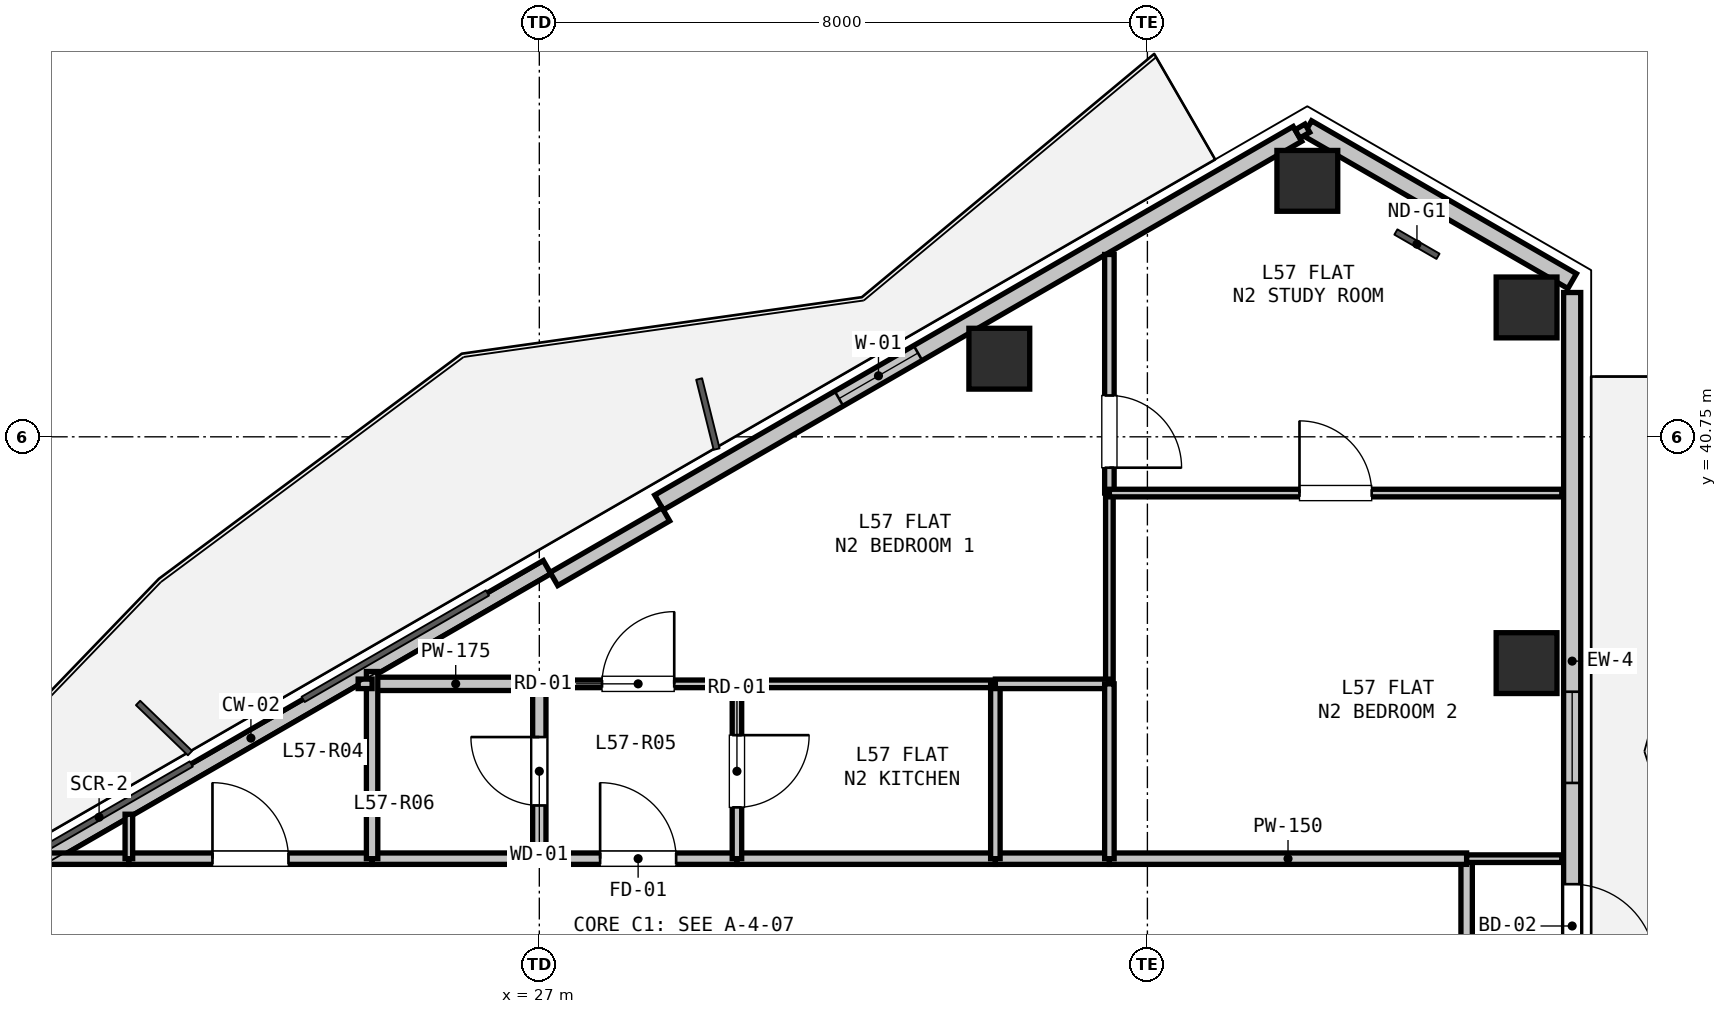
"""IFC4 building model, lengths in metres.
Left out: names, types, materials, properties, quantities, classifications, styles, units other than length and angle.
Written with IfcOpenShell. Run it as: python <this file> out.ifc"""

import sys

from ifc_helpers import new_model, si_unit, direction, frame, frame_2d, origin, origin_2d, place, context, subcontext, project, spatial, rectangle, hollow_rectangle, extrude, element, fill, save


model = new_model("IFC4")
c1 = context("Model", 3, precision=1e-05, world=origin(), true_north=direction((0.0, 1.0)))
c2 = subcontext(c1, "Body", "Model", "MODEL_VIEW")
j1 = project(units=[si_unit("LENGTHUNIT", "METRE"), si_unit("PLANEANGLEUNIT", "RADIAN")], contexts=[c1])
p1 = place(None, origin())
s1 = spatial("IfcSite", under=j1, at=p1, CompositionType="ELEMENT")
p2 = place(p1, origin())
s2 = spatial("IfcBuilding", under=s1, at=p2, CompositionType="ELEMENT")
p3 = place(p2, frame((0.0, 0.0, 205.2)))
s3 = spatial("IfcBuildingStorey", under=s2, at=p3, CompositionType="ELEMENT", Elevation=205.2)
for number, where, z_axis, x_axis in (
    (1, (33.052, 41.778, 0.0), (0.0, 0.0, 1.0), (1.0, 0.0, 0.0)),
    (2, (37.104, 44.117, 0.0), (0.0, 0.0, 1.0), (1.0, 0.0, 0.0)),
    (3, (39.988, 42.452, 0.0), (0.0, 0.0, 1.0), (1.0, 0.0, 0.0)),
    (4, (39.988, 37.773, 0.0), (0.0, 0.0, 1.0), (1.0, 0.0, 0.0)),
):
    element("IfcColumn", number, at=place(p3, frame(where, z_axis=z_axis, x_axis=x_axis)), inside=s3, PredefinedType="COLUMN", context=c2, shape_type="SweptSolid", body=[
        extrude(hollow_rectangle(XDim=0.8, YDim=0.8, WallThickness=0.025, at=origin_2d()), origin(), (0.0, 0.0, 1.0), 3.3),
    ])
p4 = place(p3, frame((37.104, 44.81, 0.0), z_axis=(0.0, 0.0, 1.0), x_axis=(0.866023907196, -0.500002592159, 0.0)))
e5 = element("IfcWall", 5, at=p4, inside=s3, PredefinedType="SOLIDWALL", context=c2, shape_type="SweptSolid", body=[
    extrude(rectangle(XDim=4.023, YDim=0.225, at=frame_2d((2.012, 0.0))), origin(), (0.0, 0.0, 1.0), 2.69),
])
p5 = place(p3, frame((19.309, 34.536, 0.0), z_axis=(0.0, 0.0, 1.0), x_axis=(0.866020680503, 0.500008180874, 0.0)))
e6 = element("IfcWall", 6, at=p5, inside=s3, PredefinedType="PARAPET", context=c2, shape_type="SweptSolid", body=[
    extrude(rectangle(XDim=8.999, YDim=0.2, at=frame_2d((4.5, 0.0))), origin(), (0.0, 0.0, 1.0), 0.2),
])
p6 = place(p3, frame((28.575, 39.885, 0.0), z_axis=(0.0, 0.0, 1.0), x_axis=(0.866016233231, 0.500015883528, 0.0)))
e7 = element("IfcWall", 7, at=p6, inside=s3, PredefinedType="SOLIDWALL", context=c2, shape_type="SweptSolid", body=[
    extrude(rectangle(XDim=9.699, YDim=0.225, at=frame_2d((4.85, 0.0))), origin(), (0.0, 0.0, 1.0), 2.69),
])
p7 = place(p6, frame((2.734, 0.0, 0.9)))
e8 = element("IfcOpeningElement", 8, at=p7, cuts=e7, PredefinedType="OPENING", context=c2, shape_type="SweptSolid", body=[
    extrude(rectangle(XDim=1.2, YDim=1.4, at=frame_2d((0.6, 0.7))), frame((0.0, 0.123, 0.0), z_axis=(0.0, -1.0, 0.0), x_axis=(1.0, 0.0, 0.0)), (0.0, 0.0, 1.0), 0.245),
])
p8 = place(p3, frame((27.192, 38.88, 0.0), z_axis=(0.0, 0.0, 1.0), x_axis=(0.866025371046, 0.500000056704, 0.0)))
e9 = element("IfcWall", 9, at=p8, inside=s3, PredefinedType="PARAPET", context=c2, shape_type="SweptSolid", body=[
    extrude(rectangle(XDim=1.7, YDim=0.2, at=frame_2d((0.85, 0.0))), origin(), (0.0, 0.0, 1.0), 2.69),
])
p9 = place(p3, frame((40.588, 42.648, 0.0), z_axis=(0.0, 0.0, 1.0), x_axis=(0.0, -1.0, 0.0)))
e10 = element("IfcWall", 10, at=p9, inside=s3, PredefinedType="SOLIDWALL", context=c2, shape_type="SweptSolid", body=[
    extrude(rectangle(XDim=9.699, YDim=0.225, at=frame_2d((4.85, 0.0))), origin(), (0.0, 0.0, 1.0), 2.69),
])
p10 = place(p9, frame((7.784, 0.0, 0.0)))
e11 = element("IfcOpeningElement", 11, at=p10, cuts=e10, PredefinedType="OPENING", context=c2, shape_type="SweptSolid", body=[
    extrude(rectangle(XDim=1.1, YDim=2.1, at=frame_2d((0.55, 1.05))), frame((0.0, 0.123, 0.0), z_axis=(0.0, -1.0, 0.0), x_axis=(1.0, 0.0, 0.0)), (0.0, 0.0, 1.0), 0.245),
])
p11 = place(p9, frame((5.252, 0.0, 0.9)))
e12 = element("IfcOpeningElement", 12, at=p11, cuts=e10, PredefinedType="OPENING", context=c2, shape_type="SweptSolid", body=[
    extrude(rectangle(XDim=1.2, YDim=1.4, at=frame_2d((0.6, 0.7))), frame((0.0, 0.123, 0.0), z_axis=(0.0, -1.0, 0.0), x_axis=(1.0, 0.0, 0.0)), (0.0, 0.0, 1.0), 0.245),
])
p12 = place(p3, frame((39.2, 35.2, 0.0), z_axis=(0.0, 0.0, 1.0), x_axis=(0.0, -1.0, 0.0)))
e13 = element("IfcWall", 13, at=p12, inside=s3, PredefinedType="PARTITIONING", context=c2, shape_type="SweptSolid", body=[
    extrude(rectangle(XDim=1.6, YDim=0.15, at=frame_2d((0.8, 0.0))), origin(), (0.0, 0.0, 1.0), 3.07),
])
p13 = place(p3, frame((20.528, 35.2, 0.0), z_axis=(0.0, 0.0, 1.0), x_axis=(1.0, 0.0, 0.0)))
e14 = element("IfcWall", 14, at=p13, inside=s3, PredefinedType="PARTITIONING", context=c2, shape_type="SweptSolid", body=[
    extrude(rectangle(XDim=1.072, YDim=0.15, at=frame_2d((0.536, 0.0))), origin(), (0.0, 0.0, 1.0), 2.365),
])
p14 = place(p3, frame((21.6, 35.2, 0.0), z_axis=(0.0, 0.0, 1.0), x_axis=(1.0, 0.0, 0.0)))
e15 = element("IfcWall", 15, at=p14, inside=s3, PredefinedType="PARTITIONING", context=c2, shape_type="SweptSolid", body=[
    extrude(rectangle(XDim=3.2, YDim=0.15, at=frame_2d((1.6, 0.0))), origin(), (0.0, 0.0, 1.0), 2.365),
])
p15 = place(p14, frame((1.1, 0.0, 0.0)))
e16 = element("IfcOpeningElement", 16, at=p15, cuts=e15, PredefinedType="OPENING", context=c2, shape_type="SweptSolid", body=[
    extrude(rectangle(XDim=1.0, YDim=2.15, at=frame_2d((0.5, 1.075))), frame((0.0, 0.085, 0.0), z_axis=(0.0, -1.0, 0.0), x_axis=(1.0, 0.0, 0.0)), (0.0, 0.0, 1.0), 0.17),
])
p16 = place(p3, frame((24.8, 35.2, 0.0), z_axis=(0.0, 0.0, 1.0), x_axis=(1.0, 0.0, 0.0)))
e17 = element("IfcWall", 17, at=p16, inside=s3, PredefinedType="PARTITIONING", context=c2, shape_type="SweptSolid", body=[
    extrude(rectangle(XDim=2.2, YDim=0.15, at=frame_2d((1.1, 0.0))), origin(), (0.0, 0.0, 1.0), 3.07),
])
p17 = place(p3, frame((27.0, 35.2, 0.0), z_axis=(0.0, 0.0, 1.0), x_axis=(1.0, 0.0, 0.0)))
e18 = element("IfcWall", 18, at=p17, inside=s3, PredefinedType="PARTITIONING", context=c2, shape_type="SweptSolid", body=[
    extrude(rectangle(XDim=2.6, YDim=0.15, at=frame_2d((1.3, 0.0))), origin(), (0.0, 0.0, 1.0), 3.07),
])
p18 = place(p17, frame((0.8, 0.0, 0.0)))
e19 = element("IfcOpeningElement", 19, at=p18, cuts=e18, PredefinedType="OPENING", context=c2, shape_type="SweptSolid", body=[
    extrude(rectangle(XDim=1.0, YDim=2.15, at=frame_2d((0.5, 1.075))), frame((0.0, 0.085, 0.0), z_axis=(0.0, -1.0, 0.0), x_axis=(1.0, 0.0, 0.0)), (0.0, 0.0, 1.0), 0.17),
])
p19 = place(p3, frame((29.6, 35.2, 0.0), z_axis=(0.0, 0.0, 1.0), x_axis=(1.0, 0.0, 0.0)))
e20 = element("IfcWall", 20, at=p19, inside=s3, PredefinedType="PARTITIONING", context=c2, shape_type="SweptSolid", body=[
    extrude(rectangle(XDim=3.4, YDim=0.15, at=frame_2d((1.7, 0.0))), origin(), (0.0, 0.0, 1.0), 3.07),
])
p20 = place(p3, frame((33.0, 35.2, 0.0), z_axis=(0.0, 0.0, 1.0), x_axis=(1.0, 0.0, 0.0)))
e21 = element("IfcWall", 21, at=p20, inside=s3, PredefinedType="PARTITIONING", context=c2, shape_type="SweptSolid", body=[
    extrude(rectangle(XDim=1.5, YDim=0.15, at=frame_2d((0.75, 0.0))), origin(), (0.0, 0.0, 1.0), 3.07),
])
p21 = place(p3, frame((34.5, 35.2, 0.0), z_axis=(0.0, 0.0, 1.0), x_axis=(1.0, 0.0, 0.0)))
e22 = element("IfcWall", 22, at=p21, inside=s3, PredefinedType="PARTITIONING", context=c2, shape_type="SweptSolid", body=[
    extrude(rectangle(XDim=4.7, YDim=0.15, at=frame_2d((2.35, 0.0))), origin(), (0.0, 0.0, 1.0), 2.518),
])
p22 = place(p3, frame((27.0, 37.5, 0.0), z_axis=(0.0, 0.0, 1.0), x_axis=(1.0, 0.0, 0.0)))
e23 = element("IfcWall", 23, at=p22, inside=s3, PredefinedType="PARTITIONING", context=c2, shape_type="SweptSolid", body=[
    extrude(rectangle(XDim=2.6, YDim=0.1, at=frame_2d((1.3, 0.0))), origin(), (0.0, 0.0, 1.0), 3.07),
])
p23 = place(p22, frame((0.825, 0.0, 0.0)))
e24 = element("IfcOpeningElement", 24, at=p23, cuts=e23, PredefinedType="OPENING", context=c2, shape_type="SweptSolid", body=[
    extrude(rectangle(XDim=0.95, YDim=2.1, at=frame_2d((0.475, 1.05))), frame((0.0, 0.06, 0.0), z_axis=(0.0, -1.0, 0.0), x_axis=(1.0, 0.0, 0.0)), (0.0, 0.0, 1.0), 0.12),
])
p24 = place(p3, frame((29.6, 37.5, 0.0), z_axis=(0.0, 0.0, 1.0), x_axis=(0.0, -1.0, 0.0)))
e25 = element("IfcWall", 25, at=p24, inside=s3, PredefinedType="PARTITIONING", context=c2, shape_type="SweptSolid", body=[
    extrude(rectangle(XDim=2.3, YDim=0.125, at=frame_2d((1.15, 0.0))), origin(), (0.0, 0.0, 1.0), 3.07),
])
p25 = place(p24, frame((0.675, 0.0, 0.0)))
e26 = element("IfcOpeningElement", 26, at=p25, cuts=e25, PredefinedType="OPENING", context=c2, shape_type="SweptSolid", body=[
    extrude(rectangle(XDim=0.95, YDim=2.1, at=frame_2d((0.475, 1.05))), frame((0.0, 0.073, 0.0), z_axis=(0.0, -1.0, 0.0), x_axis=(1.0, 0.0, 0.0)), (0.0, 0.0, 1.0), 0.145),
])
p26 = place(p3, frame((27.0, 35.2, 0.0), z_axis=(0.0, 0.0, 1.0), x_axis=(0.0, 1.0, 0.0)))
e27 = element("IfcWall", 27, at=p26, inside=s3, PredefinedType="PLUMBINGWALL", context=c2, shape_type="SweptSolid", body=[
    extrude(rectangle(XDim=2.3, YDim=0.175, at=frame_2d((1.15, 0.0))), origin(), (0.0, 0.0, 1.0), 3.07),
])
p27 = place(p26, frame((0.7, 0.0, 0.0)))
e28 = element("IfcOpeningElement", 28, at=p27, cuts=e27, PredefinedType="OPENING", context=c2, shape_type="SweptSolid", body=[
    extrude(rectangle(XDim=0.9, YDim=2.1, at=frame_2d((0.45, 1.05))), frame((0.0, 0.097, 0.0), z_axis=(0.0, -1.0, 0.0), x_axis=(1.0, 0.0, 0.0)), (0.0, 0.0, 1.0), 0.195),
])
p28 = place(p3, frame((24.8, 37.5, 0.0), z_axis=(0.0, 0.0, 1.0), x_axis=(1.0, 0.0, 0.0)))
e29 = element("IfcWall", 29, at=p28, inside=s3, PredefinedType="PLUMBINGWALL", context=c2, shape_type="SweptSolid", body=[
    extrude(rectangle(XDim=2.2, YDim=0.175, at=frame_2d((1.1, 0.0))), origin(), (0.0, 0.0, 1.0), 2.365),
])
p29 = place(p3, frame((24.8, 35.2, 0.0), z_axis=(0.0, 0.0, 1.0), x_axis=(0.0, 1.0, 0.0)))
e30 = element("IfcWall", 30, at=p29, inside=s3, PredefinedType="PARTITIONING", context=c2, shape_type="SweptSolid", body=[
    extrude(rectangle(XDim=2.462, YDim=0.15, at=frame_2d((1.231, 0.0))), origin(), (0.0, 0.0, 1.0), 2.365),
])
p30 = place(p3, frame((29.6, 37.5, 0.0), z_axis=(0.0, 0.0, 1.0), x_axis=(1.0, 0.0, 0.0)))
e31 = element("IfcWall", 31, at=p30, inside=s3, PredefinedType="PARTITIONING", context=c2, shape_type="SweptSolid", body=[
    extrude(rectangle(XDim=3.4, YDim=0.1, at=frame_2d((1.7, 0.0))), origin(), (0.0, 0.0, 1.0), 3.07),
])
p31 = place(p3, frame((33.0, 37.5, 0.0), z_axis=(0.0, 0.0, 1.0), x_axis=(0.0, -1.0, 0.0)))
e32 = element("IfcWall", 32, at=p31, inside=s3, PredefinedType="PARTITIONING", context=c2, shape_type="SweptSolid", body=[
    extrude(rectangle(XDim=2.3, YDim=0.125, at=frame_2d((1.15, 0.0))), origin(), (0.0, 0.0, 1.0), 3.07),
])
p32 = place(p3, frame((24.617, 37.5, 0.0), z_axis=(0.0, 0.0, 1.0), x_axis=(1.0, 0.0, 0.0)))
e33 = element("IfcWall", 33, at=p32, inside=s3, PredefinedType="PARTITIONING", context=c2, shape_type="SweptSolid", body=[
    extrude(rectangle(XDim=0.183, YDim=0.125, at=frame_2d((0.092, 0.0))), origin(), (0.0, 0.0, 1.0), 3.07),
])
p33 = place(p3, frame((21.6, 35.2, 0.0), z_axis=(0.0, 0.0, 1.0), x_axis=(0.0, 1.0, 0.0)))
e34 = element("IfcWall", 34, at=p33, inside=s3, PredefinedType="PARTITIONING", context=c2, shape_type="SweptSolid", body=[
    extrude(rectangle(XDim=0.585, YDim=0.1, at=frame_2d((0.292, 0.0))), origin(), (0.0, 0.0, 1.0), 2.365),
])
p34 = place(p3, frame((34.5, 43.149, 0.0), z_axis=(0.0, 0.0, 1.0), x_axis=(0.0, -1.0, 0.0)))
e35 = element("IfcWall", 35, at=p34, inside=s3, PredefinedType="PARTITIONING", context=c2, shape_type="SweptSolid", body=[
    extrude(rectangle(XDim=3.139, YDim=0.125, at=frame_2d((1.569, 0.0))), origin(), (0.0, 0.0, 1.0), 2.795),
])
p35 = place(p34, frame((1.855, 0.0, 0.0)))
e36 = element("IfcOpeningElement", 36, at=p35, cuts=e35, PredefinedType="OPENING", context=c2, shape_type="SweptSolid", body=[
    extrude(rectangle(XDim=0.95, YDim=2.1, at=frame_2d((0.475, 1.05))), frame((0.0, 0.073, 0.0), z_axis=(0.0, -1.0, 0.0), x_axis=(1.0, 0.0, 0.0)), (0.0, 0.0, 1.0), 0.145),
])
p36 = place(p3, frame((34.5, 40.01, 0.0), z_axis=(0.0, 0.0, 1.0), x_axis=(0.0, -1.0, 0.0)))
e37 = element("IfcWall", 37, at=p36, inside=s3, PredefinedType="PARTITIONING", context=c2, shape_type="SweptSolid", body=[
    extrude(rectangle(XDim=2.51, YDim=0.1, at=frame_2d((1.255, 0.0))), origin(), (0.0, 0.0, 1.0), 3.07),
])
p37 = place(p3, frame((34.5, 37.5, 0.0), z_axis=(0.0, 0.0, 1.0), x_axis=(-1.0, 0.0, 0.0)))
e38 = element("IfcWall", 38, at=p37, inside=s3, PredefinedType="PARTITIONING", context=c2, shape_type="SweptSolid", body=[
    extrude(rectangle(XDim=1.5, YDim=0.125, at=frame_2d((0.75, 0.0))), origin(), (0.0, 0.0, 1.0), 3.07),
])
p38 = place(p3, frame((40.452, 35.2, 0.0), z_axis=(0.0, 0.0, 1.0), x_axis=(-1.0, 0.0, 0.0)))
e39 = element("IfcWall", 39, at=p38, inside=s3, PredefinedType="PARTITIONING", context=c2, shape_type="SweptSolid", body=[
    extrude(rectangle(XDim=1.252, YDim=0.1, at=frame_2d((0.626, 0.0))), origin(), (0.0, 0.0, 1.0), 2.365),
])
p39 = place(p3, frame((34.5, 35.2, 0.0), z_axis=(0.0, 0.0, 1.0), x_axis=(0.0, 1.0, 0.0)))
e40 = element("IfcWall", 40, at=p39, inside=s3, PredefinedType="PARTITIONING", context=c2, shape_type="SweptSolid", body=[
    extrude(rectangle(XDim=2.3, YDim=0.125, at=frame_2d((1.15, 0.0))), origin(), (0.0, 0.0, 1.0), 3.07),
])
p40 = place(p3, frame((34.5, 40.01, 0.0), z_axis=(0.0, 0.0, 1.0), x_axis=(1.0, 0.0, 0.0)))
e41 = element("IfcWall", 41, at=p40, inside=s3, PredefinedType="PARTITIONING", context=c2, shape_type="SweptSolid", body=[
    extrude(rectangle(XDim=5.952, YDim=0.1, at=frame_2d((2.976, 0.0))), origin(), (0.0, 0.0, 1.0), 2.518),
])
p41 = place(p40, frame((2.501, 0.0, 0.0)))
e42 = element("IfcOpeningElement", 42, at=p41, cuts=e41, PredefinedType="OPENING", context=c2, shape_type="SweptSolid", body=[
    extrude(rectangle(XDim=0.95, YDim=2.1, at=frame_2d((0.475, 1.05))), frame((0.0, 0.06, 0.0), z_axis=(0.0, -1.0, 0.0), x_axis=(1.0, 0.0, 0.0)), (0.0, 0.0, 1.0), 0.12),
])
p42 = place(p3, frame((36.974, 44.735, 0.0), z_axis=(0.0, 0.0, 1.0), x_axis=(0.866131372301, 0.499816412211, 0.0)))
e43 = element("IfcWall", 43, at=p42, inside=s3, PredefinedType="PARTITIONING", context=c2, shape_type="SweptSolid", body=[
    extrude(rectangle(XDim=0.15, YDim=0.125, at=frame_2d((0.075, 0.0))), origin(), (0.0, 0.0, 1.0), 3.07),
])
p43 = place(p7, origin())
e44 = element("IfcWindow", 44, at=p43, inside=s3, PartitioningType="SINGLE_PANEL", PredefinedType="WINDOW", context=c2, shape_type="SweptSolid", body=[
    extrude(rectangle(XDim=1.2, YDim=1.4, at=frame_2d((0.6, 0.7))), frame((0.0, 0.03, 0.0), z_axis=(0.0, -1.0, 0.0), x_axis=(1.0, 0.0, 0.0)), (0.0, 0.0, 1.0), 0.06),
])
fill(e8, e44)
p44 = place(p10, origin())
e45 = element("IfcDoor", 45, at=p44, inside=s3, OperationType="SINGLE_SWING_RIGHT", PredefinedType="DOOR", context=c2, shape_type="SweptSolid", body=[
    extrude(rectangle(XDim=1.1, YDim=2.1, at=frame_2d((0.55, 1.05))), frame((0.0, 0.025, 0.0), z_axis=(0.0, -1.0, 0.0), x_axis=(1.0, 0.0, 0.0)), (0.0, 0.0, 1.0), 0.05),
])
fill(e11, e45)
p45 = place(p11, origin())
e46 = element("IfcWindow", 46, at=p45, inside=s3, PartitioningType="SINGLE_PANEL", PredefinedType="WINDOW", context=c2, shape_type="SweptSolid", body=[
    extrude(rectangle(XDim=1.2, YDim=1.4, at=frame_2d((0.6, 0.7))), frame((0.0, 0.03, 0.0), z_axis=(0.0, -1.0, 0.0), x_axis=(1.0, 0.0, 0.0)), (0.0, 0.0, 1.0), 0.06),
])
fill(e12, e46)
p46 = place(p18, origin())
e47 = element("IfcDoor", 47, at=p46, inside=s3, OperationType="SINGLE_SWING_LEFT", PredefinedType="DOOR", context=c2, shape_type="SweptSolid", body=[
    extrude(rectangle(XDim=1.0, YDim=2.15, at=frame_2d((0.5, 1.075))), frame((0.0, 0.025, 0.0), z_axis=(0.0, -1.0, 0.0), x_axis=(1.0, 0.0, 0.0)), (0.0, 0.0, 1.0), 0.05),
])
fill(e19, e47)
p47 = place(p15, origin())
e48 = element("IfcDoor", 48, at=p47, inside=s3, OperationType="SINGLE_SWING_LEFT", PredefinedType="DOOR", context=c2, shape_type="SweptSolid", body=[
    extrude(rectangle(XDim=1.0, YDim=2.15, at=frame_2d((0.5, 1.075))), frame((0.0, 0.025, 0.0), z_axis=(0.0, -1.0, 0.0), x_axis=(1.0, 0.0, 0.0)), (0.0, 0.0, 1.0), 0.05),
])
fill(e16, e48)
p48 = place(p27, origin())
e49 = element("IfcDoor", 49, at=p48, inside=s3, OperationType="SINGLE_SWING_RIGHT", PredefinedType="DOOR", context=c2, shape_type="SweptSolid", body=[
    extrude(rectangle(XDim=0.9, YDim=2.1, at=frame_2d((0.45, 1.05))), frame((0.0, 0.025, 0.0), z_axis=(0.0, -1.0, 0.0), x_axis=(1.0, 0.0, 0.0)), (0.0, 0.0, 1.0), 0.05),
])
fill(e28, e49)
p49 = place(p25, origin())
e50 = element("IfcDoor", 50, at=p49, inside=s3, OperationType="SINGLE_SWING_LEFT", PredefinedType="DOOR", context=c2, shape_type="SweptSolid", body=[
    extrude(rectangle(XDim=0.95, YDim=2.1, at=frame_2d((0.475, 1.05))), frame((0.0, 0.025, 0.0), z_axis=(0.0, -1.0, 0.0), x_axis=(1.0, 0.0, 0.0)), (0.0, 0.0, 1.0), 0.05),
])
fill(e26, e50)
p50 = place(p23, origin())
e51 = element("IfcDoor", 51, at=p50, inside=s3, OperationType="SINGLE_SWING_RIGHT", PredefinedType="DOOR", context=c2, shape_type="SweptSolid", body=[
    extrude(rectangle(XDim=0.95, YDim=2.1, at=frame_2d((0.475, 1.05))), frame((0.0, 0.025, 0.0), z_axis=(0.0, -1.0, 0.0), x_axis=(1.0, 0.0, 0.0)), (0.0, 0.0, 1.0), 0.05),
])
fill(e24, e51)
p51 = place(p35, origin())
e52 = element("IfcDoor", 52, at=p51, inside=s3, OperationType="SINGLE_SWING_RIGHT", PredefinedType="DOOR", context=c2, shape_type="SweptSolid", body=[
    extrude(rectangle(XDim=0.95, YDim=2.1, at=frame_2d((0.475, 1.05))), frame((0.0, 0.025, 0.0), z_axis=(0.0, -1.0, 0.0), x_axis=(1.0, 0.0, 0.0)), (0.0, 0.0, 1.0), 0.05),
])
fill(e36, e52)
p52 = place(p41, origin())
e53 = element("IfcDoor", 53, at=p52, inside=s3, OperationType="SINGLE_SWING_LEFT", PredefinedType="DOOR", context=c2, shape_type="SweptSolid", body=[
    extrude(rectangle(XDim=0.95, YDim=2.1, at=frame_2d((0.475, 1.05))), frame((0.0, 0.025, 0.0), z_axis=(0.0, -1.0, 0.0), x_axis=(1.0, 0.0, 0.0)), (0.0, 0.0, 1.0), 0.05),
])
fill(e42, e53)
save(model, sys.argv[1])
